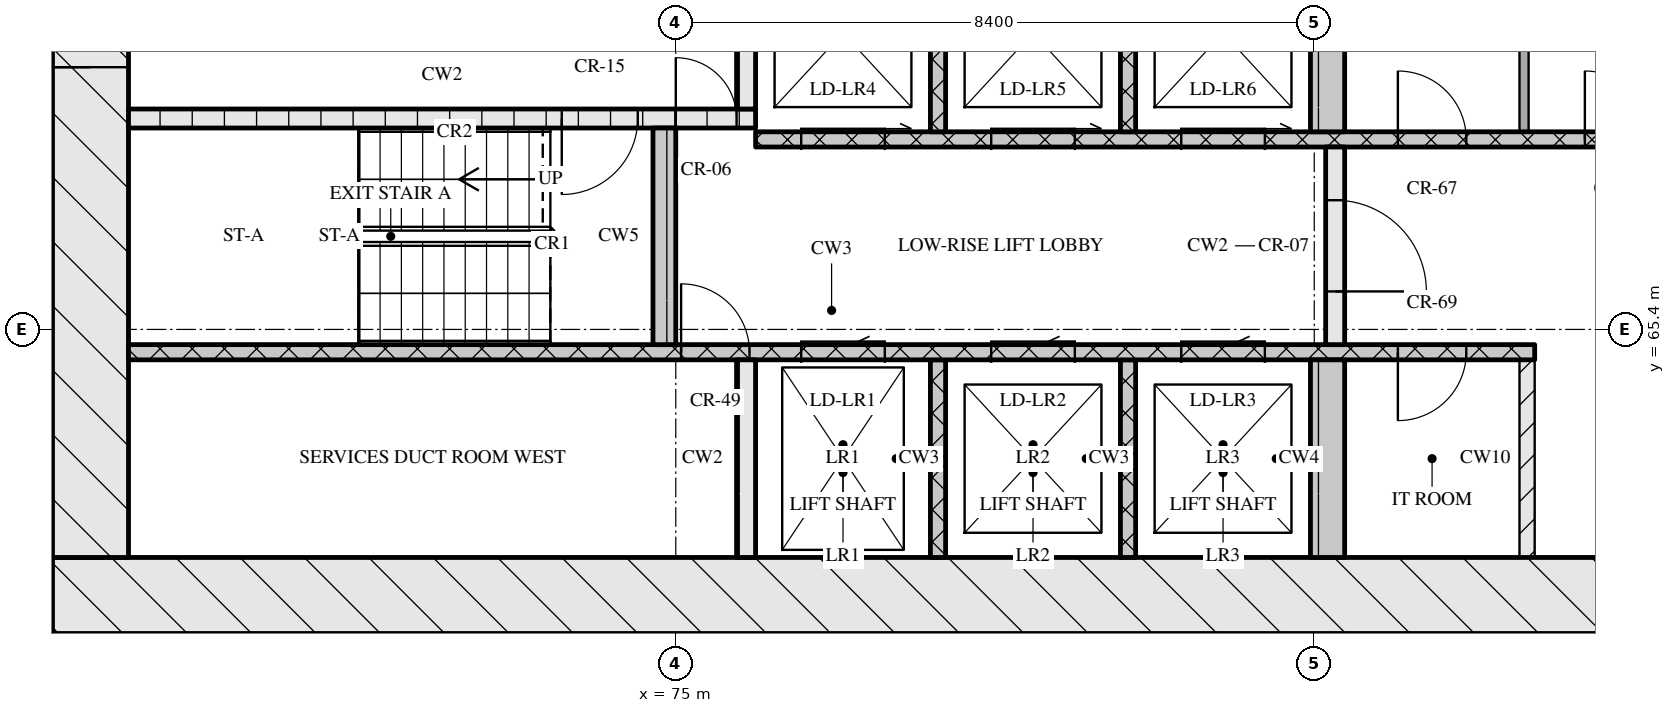
"""IFC4 building model, lengths in metres.
Left out: names, types, materials, properties, quantities, classifications, styles, units other than length and angle.
Written with IfcOpenShell. Run it as: python <this file> out.ifc"""

import sys

from ifc_helpers import new_model, si_unit, direction, frame, frame_2d, origin, place, context, subcontext, project, spatial, rectangle, extrude, element, fill, save


model = new_model("IFC4")
c1 = context("Model", 3, precision=1e-05, world=origin(), true_north=direction((0.0, 1.0)))
c2 = subcontext(c1, "Body", "Model", "MODEL_VIEW")
j1 = project(units=[si_unit("LENGTHUNIT", "METRE"), si_unit("PLANEANGLEUNIT", "RADIAN")], contexts=[c1])
p1 = place(None, origin())
s1 = spatial("IfcSite", under=j1, at=p1, CompositionType="ELEMENT")
p2 = place(p1, origin())
s2 = spatial("IfcBuilding", under=s1, at=p2, CompositionType="ELEMENT")
p3 = place(p2, frame((0.0, 0.0, 98.85)))
s3 = spatial("IfcBuildingStorey", under=s2, at=p3, CompositionType="ELEMENT", Elevation=98.85)
p4 = place(p3, frame((66.8, 61.9, 0.0), z_axis=(0.0, 0.0, 1.0), x_axis=(1.0, 0.0, 0.0)))
e1 = element("IfcWall", 1, at=p4, inside=s3, PredefinedType="SOLIDWALL", context=c2, shape_type="SweptSolid", body=[
    extrude(rectangle(XDim=41.6, YDim=1.0, at=frame_2d((20.8, 0.0))), origin(), (0.0, 0.0, 1.0), 3.32),
])
p5 = place(p4, frame((21.15, 0.0, 0.0)))
e2 = element("IfcOpeningElement", 2, at=p5, cuts=e1, PredefinedType="OPENING", context=c2, shape_type="SweptSolid", body=[
    extrude(rectangle(XDim=1.8, YDim=2.1, at=frame_2d((0.9, 1.05))), frame((0.0, 0.51, 0.0), z_axis=(0.0, -1.0, 0.0), x_axis=(1.0, 0.0, 0.0)), (0.0, 0.0, 1.0), 1.02),
])
p6 = place(p3, frame((67.3, 62.4, 0.0), z_axis=(0.0, 0.0, 1.0), x_axis=(0.0, 1.0, 0.0)))
e3 = element("IfcWall", 3, at=p6, inside=s3, PredefinedType="SOLIDWALL", context=c2, shape_type="SweptSolid", body=[
    extrude(rectangle(XDim=12.0, YDim=1.0, at=frame_2d((6.0, 0.0))), origin(), (0.0, 0.0, 1.0), 3.32),
])
p7 = place(p6, frame((6.45, 0.0, 0.0)))
e4 = element("IfcOpeningElement", 4, at=p7, cuts=e3, PredefinedType="OPENING", context=c2, shape_type="SweptSolid", body=[
    extrude(rectangle(XDim=1.2, YDim=2.1, at=frame_2d((0.6, 1.05))), frame((0.0, 0.51, 0.0), z_axis=(0.0, -1.0, 0.0), x_axis=(1.0, 0.0, 0.0)), (0.0, 0.0, 1.0), 1.02),
])
p8 = place(p3, frame((75.925, 62.4, 0.0), z_axis=(0.0, 0.0, 1.0), x_axis=(0.0, 1.0, 0.0)))
e5 = element("IfcWall", 5, at=p8, inside=s3, PredefinedType="SOLIDWALL", context=c2, shape_type="SweptSolid", body=[
    extrude(rectangle(XDim=2.6, YDim=0.25, at=frame_2d((1.3, 0.0))), origin(), (0.0, 0.0, 1.0), 3.32),
])
for number, where, z_axis, x_axis in (
    (6, (78.45, 62.4, 0.0), (0.0, 0.0, 1.0), (0.0, 1.0, 0.0)),
    (7, (80.95, 62.4, 0.0), (0.0, 0.0, 1.0), (0.0, 1.0, 0.0)),
):
    element("IfcWall", number, at=place(p3, frame(where, z_axis=z_axis, x_axis=x_axis)), inside=s3, PredefinedType="SOLIDWALL", context=c2, shape_type="SweptSolid", body=[
        extrude(rectangle(XDim=2.6, YDim=0.2, at=frame_2d((1.3, 0.0))), origin(), (0.0, 0.0, 1.0), 3.32),
    ])
p9 = place(p3, frame((83.575, 62.4, 0.0), z_axis=(0.0, 0.0, 1.0), x_axis=(0.0, 1.0, 0.0)))
e8 = element("IfcWall", 8, at=p9, inside=s3, PredefinedType="SOLIDWALL", context=c2, shape_type="SweptSolid", body=[
    extrude(rectangle(XDim=2.6, YDim=0.45, at=frame_2d((1.3, 0.0))), origin(), (0.0, 0.0, 1.0), 3.32),
])
p10 = place(p3, frame((86.2, 62.4, 0.0), z_axis=(0.0, 0.0, 1.0), x_axis=(0.0, 1.0, 0.0)))
e9 = element("IfcWall", 9, at=p10, inside=s3, PredefinedType="PARTITIONING", context=c2, shape_type="SweptSolid", body=[
    extrude(rectangle(XDim=2.6, YDim=0.2, at=frame_2d((1.3, 0.0))), origin(), (0.0, 0.0, 1.0), 3.32),
])
p11 = place(p3, frame((67.8, 65.1, 0.0), z_axis=(0.0, 0.0, 1.0), x_axis=(1.0, 0.0, 0.0)))
e10 = element("IfcWall", 10, at=p11, inside=s3, PredefinedType="SOLIDWALL", context=c2, shape_type="SweptSolid", body=[
    extrude(rectangle(XDim=18.5, YDim=0.2, at=frame_2d((9.25, 0.0))), origin(), (0.0, 0.0, 1.0), 3.32),
])
p12 = place(p11, frame((7.27, 0.0, 0.0)))
e11 = element("IfcOpeningElement", 11, at=p12, cuts=e10, PredefinedType="OPENING", context=c2, shape_type="SweptSolid", body=[
    extrude(rectangle(XDim=0.9, YDim=2.1, at=frame_2d((0.45, 1.05))), frame((0.0, 0.11, 0.0), z_axis=(0.0, -1.0, 0.0), x_axis=(1.0, 0.0, 0.0)), (0.0, 0.0, 1.0), 0.22),
])
p13 = place(p11, frame((8.85, 0.0, 0.0)))
e12 = element("IfcOpeningElement", 12, at=p13, cuts=e10, PredefinedType="OPENING", context=c2, shape_type="SweptSolid", body=[
    extrude(rectangle(XDim=1.1, YDim=2.1, at=frame_2d((0.55, 1.05))), frame((0.0, 0.11, 0.0), z_axis=(0.0, -1.0, 0.0), x_axis=(1.0, 0.0, 0.0)), (0.0, 0.0, 1.0), 0.22),
])
p14 = place(p11, frame((11.35, 0.0, 0.0)))
e13 = element("IfcOpeningElement", 13, at=p14, cuts=e10, PredefinedType="OPENING", context=c2, shape_type="SweptSolid", body=[
    extrude(rectangle(XDim=1.1, YDim=2.1, at=frame_2d((0.55, 1.05))), frame((0.0, 0.11, 0.0), z_axis=(0.0, -1.0, 0.0), x_axis=(1.0, 0.0, 0.0)), (0.0, 0.0, 1.0), 0.22),
])
p15 = place(p11, frame((13.85, 0.0, 0.0)))
e14 = element("IfcOpeningElement", 14, at=p15, cuts=e10, PredefinedType="OPENING", context=c2, shape_type="SweptSolid", body=[
    extrude(rectangle(XDim=1.1, YDim=2.1, at=frame_2d((0.55, 1.05))), frame((0.0, 0.11, 0.0), z_axis=(0.0, -1.0, 0.0), x_axis=(1.0, 0.0, 0.0)), (0.0, 0.0, 1.0), 0.22),
])
p16 = place(p11, frame((16.7, 0.0, 0.0)))
e15 = element("IfcOpeningElement", 15, at=p16, cuts=e10, PredefinedType="OPENING", context=c2, shape_type="SweptSolid", body=[
    extrude(rectangle(XDim=0.9, YDim=2.1, at=frame_2d((0.45, 1.05))), frame((0.0, 0.11, 0.0), z_axis=(0.0, -1.0, 0.0), x_axis=(1.0, 0.0, 0.0)), (0.0, 0.0, 1.0), 0.22),
])
p17 = place(p3, frame((74.85, 65.2, 0.0), z_axis=(0.0, 0.0, 1.0), x_axis=(0.0, 1.0, 0.0)))
e16 = element("IfcWall", 16, at=p17, inside=s3, PredefinedType="SOLIDWALL", context=c2, shape_type="SweptSolid", body=[
    extrude(rectangle(XDim=2.85, YDim=0.3, at=frame_2d((1.425, 0.0))), origin(), (0.0, 0.0, 1.0), 3.32),
])
p18 = place(p3, frame((83.675, 65.2, 0.0), z_axis=(0.0, 0.0, 1.0), x_axis=(0.0, 1.0, 0.0)))
e17 = element("IfcWall", 17, at=p18, inside=s3, PredefinedType="SOLIDWALL", context=c2, shape_type="SweptSolid", body=[
    extrude(rectangle(XDim=2.6, YDim=0.25, at=frame_2d((1.3, 0.0))), origin(), (0.0, 0.0, 1.0), 3.32),
])
p19 = place(p18, frame((0.7, 0.0, 0.0)))
e18 = element("IfcOpeningElement", 18, at=p19, cuts=e17, PredefinedType="OPENING", context=c2, shape_type="SweptSolid", body=[
    extrude(rectangle(XDim=1.2, YDim=2.1, at=frame_2d((0.6, 1.05))), frame((0.0, 0.135, 0.0), z_axis=(0.0, -1.0, 0.0), x_axis=(1.0, 0.0, 0.0)), (0.0, 0.0, 1.0), 0.27),
])
p20 = place(p3, frame((76.05, 67.9, 0.0), z_axis=(0.0, 0.0, 1.0), x_axis=(1.0, 0.0, 0.0)))
e19 = element("IfcWall", 19, at=p20, inside=s3, PredefinedType="SOLIDWALL", context=c2, shape_type="SweptSolid", body=[
    extrude(rectangle(XDim=23.1, YDim=0.2, at=frame_2d((11.55, 0.0))), origin(), (0.0, 0.0, 1.0), 3.32),
])
p21 = place(p20, frame((0.6, 0.0, 0.0)))
e20 = element("IfcOpeningElement", 20, at=p21, cuts=e19, PredefinedType="OPENING", context=c2, shape_type="SweptSolid", body=[
    extrude(rectangle(XDim=1.1, YDim=2.1, at=frame_2d((0.55, 1.05))), frame((0.0, 0.11, 0.0), z_axis=(0.0, -1.0, 0.0), x_axis=(1.0, 0.0, 0.0)), (0.0, 0.0, 1.0), 0.22),
])
p22 = place(p20, frame((3.1, 0.0, 0.0)))
e21 = element("IfcOpeningElement", 21, at=p22, cuts=e19, PredefinedType="OPENING", context=c2, shape_type="SweptSolid", body=[
    extrude(rectangle(XDim=1.1, YDim=2.1, at=frame_2d((0.55, 1.05))), frame((0.0, 0.11, 0.0), z_axis=(0.0, -1.0, 0.0), x_axis=(1.0, 0.0, 0.0)), (0.0, 0.0, 1.0), 0.22),
])
p23 = place(p20, frame((5.6, 0.0, 0.0)))
e22 = element("IfcOpeningElement", 22, at=p23, cuts=e19, PredefinedType="OPENING", context=c2, shape_type="SweptSolid", body=[
    extrude(rectangle(XDim=1.1, YDim=2.1, at=frame_2d((0.55, 1.05))), frame((0.0, 0.11, 0.0), z_axis=(0.0, -1.0, 0.0), x_axis=(1.0, 0.0, 0.0)), (0.0, 0.0, 1.0), 0.22),
])
p24 = place(p20, frame((8.45, 0.0, 0.0)))
e23 = element("IfcOpeningElement", 23, at=p24, cuts=e19, PredefinedType="OPENING", context=c2, shape_type="SweptSolid", body=[
    extrude(rectangle(XDim=0.9, YDim=2.1, at=frame_2d((0.45, 1.05))), frame((0.0, 0.11, 0.0), z_axis=(0.0, -1.0, 0.0), x_axis=(1.0, 0.0, 0.0)), (0.0, 0.0, 1.0), 0.22),
])
p25 = place(p20, frame((10.91, 0.0, 0.0)))
e24 = element("IfcOpeningElement", 24, at=p25, cuts=e19, PredefinedType="OPENING", context=c2, shape_type="SweptSolid", body=[
    extrude(rectangle(XDim=0.9, YDim=2.1, at=frame_2d((0.45, 1.05))), frame((0.0, 0.11, 0.0), z_axis=(0.0, -1.0, 0.0), x_axis=(1.0, 0.0, 0.0)), (0.0, 0.0, 1.0), 0.22),
])
p26 = place(p20, frame((13.55, 0.0, 0.0)))
e25 = element("IfcOpeningElement", 25, at=p26, cuts=e19, PredefinedType="OPENING", context=c2, shape_type="SweptSolid", body=[
    extrude(rectangle(XDim=1.0, YDim=2.1, at=frame_2d((0.5, 1.05))), frame((0.0, 0.11, 0.0), z_axis=(0.0, -1.0, 0.0), x_axis=(1.0, 0.0, 0.0)), (0.0, 0.0, 1.0), 0.22),
])
for number, where, z_axis, x_axis in (
    (26, (78.45, 68.0, 0.0), (0.0, 0.0, 1.0), (0.0, 1.0, 0.0)),
    (27, (80.95, 68.0, 0.0), (0.0, 0.0, 1.0), (0.0, 1.0, 0.0)),
):
    element("IfcWall", number, at=place(p3, frame(where, z_axis=z_axis, x_axis=x_axis)), inside=s3, PredefinedType="SOLIDWALL", context=c2, shape_type="SweptSolid", body=[
        extrude(rectangle(XDim=2.6, YDim=0.2, at=frame_2d((1.3, 0.0))), origin(), (0.0, 0.0, 1.0), 3.32),
    ])
p27 = place(p3, frame((83.575, 68.0, 0.0), z_axis=(0.0, 0.0, 1.0), x_axis=(0.0, 1.0, 0.0)))
e28 = element("IfcWall", 28, at=p27, inside=s3, PredefinedType="SOLIDWALL", context=c2, shape_type="SweptSolid", body=[
    extrude(rectangle(XDim=2.6, YDim=0.45, at=frame_2d((1.3, 0.0))), origin(), (0.0, 0.0, 1.0), 3.32),
])
p28 = place(p3, frame((86.16, 68.0, 0.0), z_axis=(0.0, 0.0, 1.0), x_axis=(0.0, 1.0, 0.0)))
e29 = element("IfcWall", 29, at=p28, inside=s3, PredefinedType="PARTITIONING", context=c2, shape_type="SweptSolid", body=[
    extrude(rectangle(XDim=2.6, YDim=0.12, at=frame_2d((1.3, 0.0))), origin(), (0.0, 0.0, 1.0), 3.32),
])
p29 = place(p3, frame((67.8, 68.175, 0.0), z_axis=(0.0, 0.0, 1.0), x_axis=(1.0, 0.0, 0.0)))
e30 = element("IfcWall", 30, at=p29, inside=s3, PredefinedType="SOLIDWALL", context=c2, shape_type="SweptSolid", body=[
    extrude(rectangle(XDim=8.25, YDim=0.25, at=frame_2d((4.125, 0.0))), origin(), (0.0, 0.0, 1.0), 3.32),
])
p30 = place(p29, frame((5.7, 0.0, 0.0)))
e31 = element("IfcOpeningElement", 31, at=p30, cuts=e30, PredefinedType="OPENING", context=c2, shape_type="SweptSolid", body=[
    extrude(rectangle(XDim=1.0, YDim=2.1, at=frame_2d((0.5, 1.05))), frame((0.0, 0.135, 0.0), z_axis=(0.0, -1.0, 0.0), x_axis=(1.0, 0.0, 0.0)), (0.0, 0.0, 1.0), 0.27),
])
p31 = place(p29, frame((7.2, 0.0, 0.0)))
e32 = element("IfcOpeningElement", 32, at=p31, cuts=e30, PredefinedType="OPENING", context=c2, shape_type="SweptSolid", body=[
    extrude(rectangle(XDim=0.8, YDim=2.1, at=frame_2d((0.4, 1.05))), frame((0.0, 0.135, 0.0), z_axis=(0.0, -1.0, 0.0), x_axis=(1.0, 0.0, 0.0)), (0.0, 0.0, 1.0), 0.27),
])
p32 = place(p3, frame((75.925, 68.3, 0.0), z_axis=(0.0, 0.0, 1.0), x_axis=(0.0, 1.0, 0.0)))
e33 = element("IfcWall", 33, at=p32, inside=s3, PredefinedType="SOLIDWALL", context=c2, shape_type="SweptSolid", body=[
    extrude(rectangle(XDim=2.3, YDim=0.25, at=frame_2d((1.15, 0.0))), origin(), (0.0, 0.0, 1.0), 3.32),
])
p33 = place(p12, origin())
e34 = element("IfcDoor", 34, at=p33, inside=s3, OperationType="SINGLE_SWING_LEFT", PredefinedType="DOOR", context=c2, shape_type="SweptSolid", body=[
    extrude(rectangle(XDim=0.9, YDim=2.1, at=frame_2d((0.45, 1.05))), frame((0.0, 0.025, 0.0), z_axis=(0.0, -1.0, 0.0), x_axis=(1.0, 0.0, 0.0)), (0.0, 0.0, 1.0), 0.05),
])
fill(e11, e34)
p34 = place(p13, origin())
e35 = element("IfcDoor", 35, at=p34, inside=s3, OperationType="SLIDING_TO_LEFT", PredefinedType="DOOR", context=c2, shape_type="SweptSolid", body=[
    extrude(rectangle(XDim=1.1, YDim=2.1, at=frame_2d((0.55, 1.05))), frame((0.0, 0.025, 0.0), z_axis=(0.0, -1.0, 0.0), x_axis=(1.0, 0.0, 0.0)), (0.0, 0.0, 1.0), 0.05),
])
fill(e12, e35)
p35 = place(p14, origin())
e36 = element("IfcDoor", 36, at=p35, inside=s3, OperationType="SLIDING_TO_LEFT", PredefinedType="DOOR", context=c2, shape_type="SweptSolid", body=[
    extrude(rectangle(XDim=1.1, YDim=2.1, at=frame_2d((0.55, 1.05))), frame((0.0, 0.025, 0.0), z_axis=(0.0, -1.0, 0.0), x_axis=(1.0, 0.0, 0.0)), (0.0, 0.0, 1.0), 0.05),
])
fill(e13, e36)
p36 = place(p15, origin())
e37 = element("IfcDoor", 37, at=p36, inside=s3, OperationType="SLIDING_TO_LEFT", PredefinedType="DOOR", context=c2, shape_type="SweptSolid", body=[
    extrude(rectangle(XDim=1.1, YDim=2.1, at=frame_2d((0.55, 1.05))), frame((0.0, 0.025, 0.0), z_axis=(0.0, -1.0, 0.0), x_axis=(1.0, 0.0, 0.0)), (0.0, 0.0, 1.0), 0.05),
])
fill(e14, e37)
p37 = place(p16, origin())
e38 = element("IfcDoor", 38, at=p37, inside=s3, OperationType="SINGLE_SWING_RIGHT", PredefinedType="DOOR", context=c2, shape_type="SweptSolid", body=[
    extrude(rectangle(XDim=0.9, YDim=2.1, at=frame_2d((0.45, 1.05))), frame((0.0, 0.025, 0.0), z_axis=(0.0, -1.0, 0.0), x_axis=(1.0, 0.0, 0.0)), (0.0, 0.0, 1.0), 0.05),
])
fill(e15, e38)
p38 = place(p19, origin())
e39 = element("IfcDoor", 39, at=p38, inside=s3, OperationType="SINGLE_SWING_RIGHT", PredefinedType="DOOR", context=c2, shape_type="SweptSolid", body=[
    extrude(rectangle(XDim=1.2, YDim=2.1, at=frame_2d((0.6, 1.05))), frame((0.0, 0.025, 0.0), z_axis=(0.0, -1.0, 0.0), x_axis=(1.0, 0.0, 0.0)), (0.0, 0.0, 1.0), 0.05),
])
fill(e18, e39)
p39 = place(p21, origin())
e40 = element("IfcDoor", 40, at=p39, inside=s3, OperationType="SLIDING_TO_RIGHT", PredefinedType="DOOR", context=c2, shape_type="SweptSolid", body=[
    extrude(rectangle(XDim=1.1, YDim=2.1, at=frame_2d((0.55, 1.05))), frame((0.0, 0.025, 0.0), z_axis=(0.0, -1.0, 0.0), x_axis=(1.0, 0.0, 0.0)), (0.0, 0.0, 1.0), 0.05),
])
fill(e20, e40)
p40 = place(p22, origin())
e41 = element("IfcDoor", 41, at=p40, inside=s3, OperationType="SLIDING_TO_RIGHT", PredefinedType="DOOR", context=c2, shape_type="SweptSolid", body=[
    extrude(rectangle(XDim=1.1, YDim=2.1, at=frame_2d((0.55, 1.05))), frame((0.0, 0.025, 0.0), z_axis=(0.0, -1.0, 0.0), x_axis=(1.0, 0.0, 0.0)), (0.0, 0.0, 1.0), 0.05),
])
fill(e21, e41)
p41 = place(p23, origin())
e42 = element("IfcDoor", 42, at=p41, inside=s3, OperationType="SLIDING_TO_RIGHT", PredefinedType="DOOR", context=c2, shape_type="SweptSolid", body=[
    extrude(rectangle(XDim=1.1, YDim=2.1, at=frame_2d((0.55, 1.05))), frame((0.0, 0.025, 0.0), z_axis=(0.0, -1.0, 0.0), x_axis=(1.0, 0.0, 0.0)), (0.0, 0.0, 1.0), 0.05),
])
fill(e22, e42)
p42 = place(p24, origin())
e43 = element("IfcDoor", 43, at=p42, inside=s3, OperationType="SINGLE_SWING_LEFT", PredefinedType="DOOR", context=c2, shape_type="SweptSolid", body=[
    extrude(rectangle(XDim=0.9, YDim=2.1, at=frame_2d((0.45, 1.05))), frame((0.0, 0.025, 0.0), z_axis=(0.0, -1.0, 0.0), x_axis=(1.0, 0.0, 0.0)), (0.0, 0.0, 1.0), 0.05),
])
fill(e23, e43)
p43 = place(p25, origin())
e44 = element("IfcDoor", 44, at=p43, inside=s3, OperationType="SINGLE_SWING_LEFT", PredefinedType="DOOR", context=c2, shape_type="SweptSolid", body=[
    extrude(rectangle(XDim=0.9, YDim=2.1, at=frame_2d((0.45, 1.05))), frame((0.0, 0.025, 0.0), z_axis=(0.0, -1.0, 0.0), x_axis=(1.0, 0.0, 0.0)), (0.0, 0.0, 1.0), 0.05),
])
fill(e24, e44)
p44 = place(p30, origin())
e45 = element("IfcDoor", 45, at=p44, inside=s3, OperationType="SINGLE_SWING_RIGHT", PredefinedType="DOOR", context=c2, shape_type="SweptSolid", body=[
    extrude(rectangle(XDim=1.0, YDim=2.1, at=frame_2d((0.5, 1.05))), frame((0.0, 0.025, 0.0), z_axis=(0.0, -1.0, 0.0), x_axis=(1.0, 0.0, 0.0)), (0.0, 0.0, 1.0), 0.05),
])
fill(e31, e45)
p45 = place(p31, origin())
e46 = element("IfcDoor", 46, at=p45, inside=s3, OperationType="SINGLE_SWING_LEFT", PredefinedType="DOOR", context=c2, shape_type="SweptSolid", body=[
    extrude(rectangle(XDim=0.8, YDim=2.1, at=frame_2d((0.4, 1.05))), frame((0.0, 0.025, 0.0), z_axis=(0.0, -1.0, 0.0), x_axis=(1.0, 0.0, 0.0)), (0.0, 0.0, 1.0), 0.05),
])
fill(e32, e46)
p46 = place(p7, origin())
e47 = element("IfcDoor", 47, at=p46, inside=s3, OperationType="SINGLE_SWING_LEFT", PredefinedType="DOOR", context=c2, shape_type="SweptSolid", body=[
    extrude(rectangle(XDim=1.2, YDim=2.1, at=frame_2d((0.6, 1.05))), frame((0.0, 0.025, 0.0), z_axis=(0.0, -1.0, 0.0), x_axis=(1.0, 0.0, 0.0)), (0.0, 0.0, 1.0), 0.05),
])
fill(e4, e47)
save(model, sys.argv[1])
